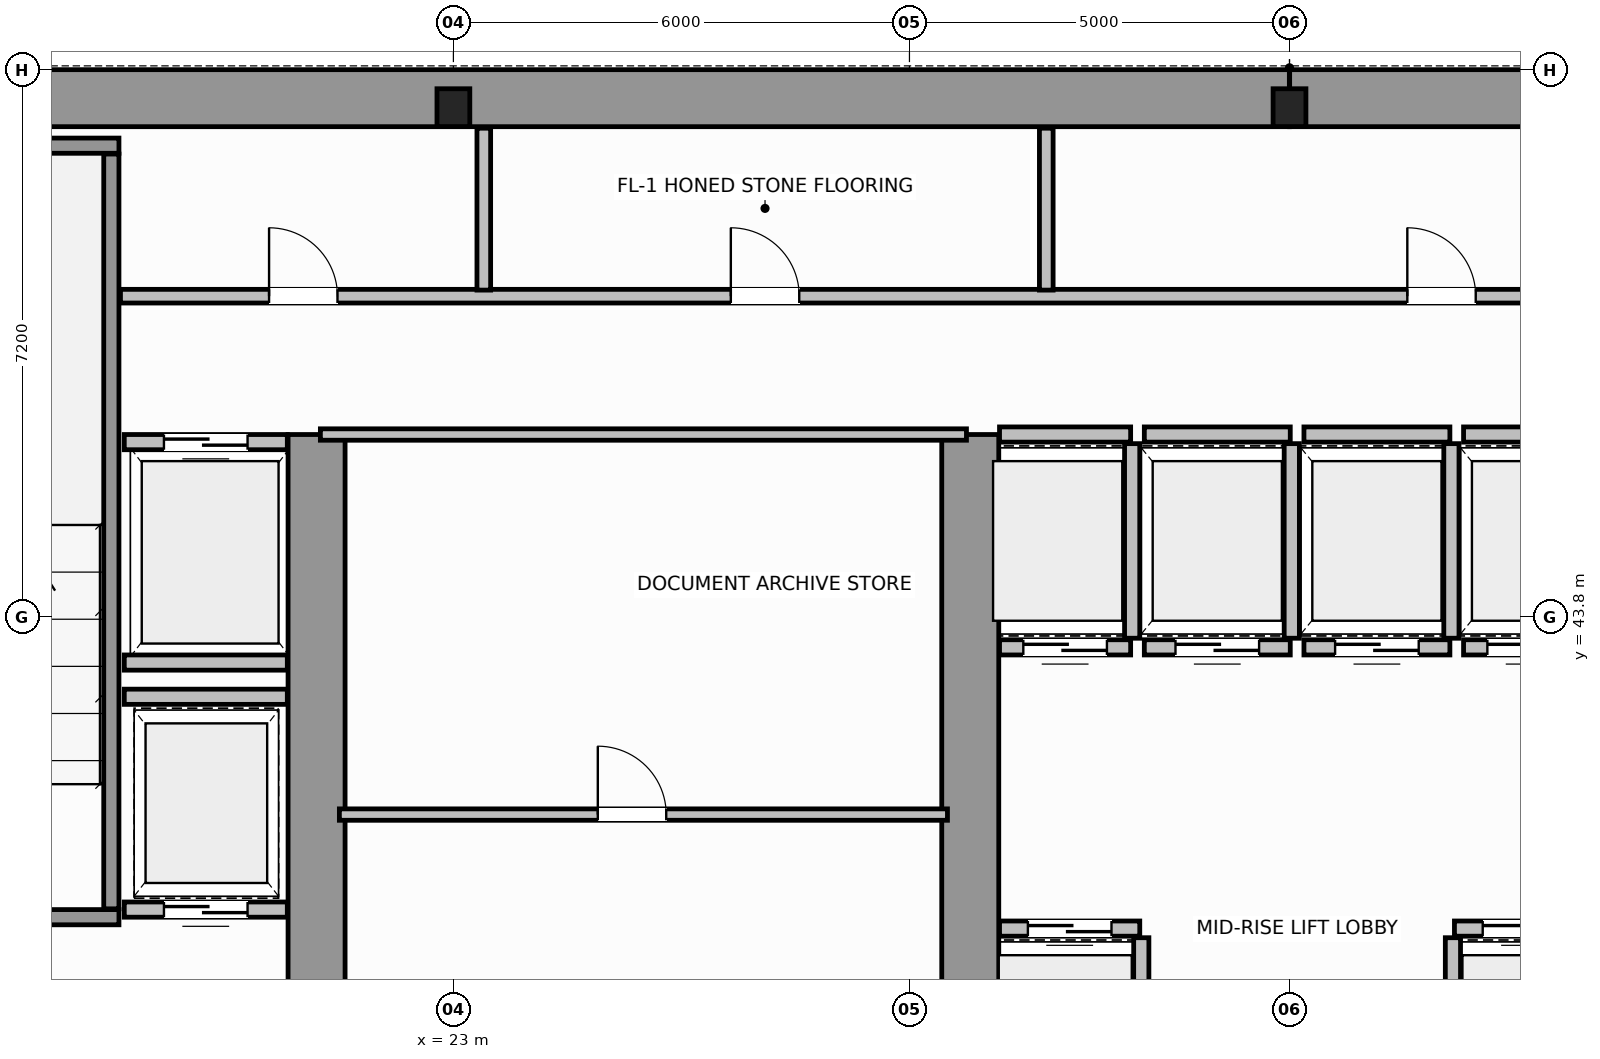
"""IFC4 building model, lengths in metres.
Left out: names, types, materials, properties, quantities, classifications, styles, units other than length and angle.
Written with IfcOpenShell. Run it as: python <this file> out.ifc"""

import sys

from ifc_helpers import new_model, si_unit, direction, frame, frame_2d, origin, origin_2d, place, context, subcontext, project, spatial, rectangle, i_section, extrude, source, transform, mapped, element, fill, save


model = new_model("IFC4")
c1 = context("Model", 3, precision=1e-05, world=origin(), true_north=direction((0.0, 1.0)))
c2 = subcontext(c1, "Body", "Model", "MODEL_VIEW")
j1 = project(units=[si_unit("LENGTHUNIT", "METRE"), si_unit("PLANEANGLEUNIT", "RADIAN")], contexts=[c1])
p1 = place(None, origin())
s1 = spatial("IfcSite", under=j1, at=p1, CompositionType="ELEMENT")
p2 = place(p1, origin())
s2 = spatial("IfcBuilding", under=s1, at=p2, CompositionType="ELEMENT")
p3 = place(p2, frame((0.0, 0.0, 145.2)))
s3 = spatial("IfcBuildingStorey", under=s2, at=p3, CompositionType="ELEMENT", Elevation=145.2)
m1 = source(origin(), c2, "Body", "SweptSolid", [
    extrude(i_section(OverallWidth=0.432, OverallDepth=0.498, WebThickness=0.055, FlangeThickness=0.068, FilletRadius=0.015, at=origin_2d()), origin(), (0.0, 0.0, 1.0), 3.8),
])
for number, where, z_axis, x_axis in (
    (1, (23.0, 50.5, 0.0), (0.0, 0.0, 1.0), (1.0, 0.0, 0.0)),
    (2, (34.0, 50.5, 0.0), (0.0, 0.0, 1.0), (1.0, 0.0, 0.0)),
):
    element("IfcColumn", number, at=place(p3, frame(where, z_axis=z_axis, x_axis=x_axis)), inside=s3, PredefinedType="COLUMN", context=c2, shape_type="MappedRepresentation", body=[
        mapped(m1, transform((0.0, 0.0, 0.0), scale=1.0)),
    ])
for number, where, z_axis, x_axis in (
    (3, (14.379, 50.625, 0.0), (0.0, 0.0, 1.0), (1.0, 0.0, 0.0)),
    (4, (34.002, 50.625, 0.0), (0.0, 0.0, 1.0), (1.0, 0.0, 0.0)),
):
    element("IfcWall", number, at=place(p3, frame(where, z_axis=z_axis, x_axis=x_axis)), inside=s3, PredefinedType="SHEAR", context=c2, shape_type="SweptSolid", body=[
        extrude(rectangle(XDim=19.619, YDim=0.75, at=frame_2d((9.81, 0.0))), origin(), (0.0, 0.0, 1.0), 3.8),
    ])
for number, where, z_axis, x_axis in (
    (5, (21.2, 36.895, 0.0), (0.0, 0.0, 1.0), (0.0, 1.0, 0.0)),
    (6, (29.8, 36.895, 0.0), (0.0, 0.0, 1.0), (0.0, 1.0, 0.0)),
):
    element("IfcWall", number, at=place(p3, frame(where, z_axis=z_axis, x_axis=x_axis)), inside=s3, PredefinedType="SHEAR", context=c2, shape_type="SweptSolid", body=[
        extrude(rectangle(XDim=9.305, YDim=0.75, at=frame_2d((4.652, 0.0))), origin(), (0.0, 0.0, 1.0), 3.8),
    ])
p4 = place(p3, frame((14.375, 39.85, 0.0), z_axis=(0.0, 0.0, 1.0), x_axis=(1.0, 0.0, 0.0)))
e7 = element("IfcWall", 7, at=p4, inside=s3, PredefinedType="SOLIDWALL", context=c2, shape_type="SweptSolid", body=[
    extrude(rectangle(XDim=4.225, YDim=0.2, at=frame_2d((2.113, 0.0))), origin(), (0.0, 0.0, 1.0), 3.8),
])
p5 = place(p4, frame((1.8, 0.0, 0.0)))
e8 = element("IfcOpeningElement", 8, at=p5, cuts=e7, PredefinedType="OPENING", context=c2, shape_type="SweptSolid", body=[
    extrude(rectangle(XDim=1.1, YDim=2.15, at=frame_2d((0.55, 1.075))), frame((0.0, 0.11, 0.0), z_axis=(0.0, -1.0, 0.0), x_axis=(1.0, 0.0, 0.0)), (0.0, 0.0, 1.0), 0.22),
])
p6 = place(p3, frame((14.375, 50.0, 0.0), z_axis=(0.0, 0.0, 1.0), x_axis=(1.0, 0.0, 0.0)))
e9 = element("IfcWall", 9, at=p6, inside=s3, PredefinedType="SOLIDWALL", context=c2, shape_type="SweptSolid", body=[
    extrude(rectangle(XDim=4.225, YDim=0.2, at=frame_2d((2.113, 0.0))), origin(), (0.0, 0.0, 1.0), 3.8),
])
p7 = place(p3, frame((18.5, 39.96, 0.0), z_axis=(0.0, 0.0, 1.0), x_axis=(0.0, 1.0, 0.0)))
e10 = element("IfcWall", 10, at=p7, inside=s3, PredefinedType="SOLIDWALL", context=c2, shape_type="SweptSolid", body=[
    extrude(rectangle(XDim=9.93, YDim=0.2, at=frame_2d((4.965, 0.0))), origin(), (0.0, 0.0, 1.0), 3.8),
])
p8 = place(p3, frame((30.185, 39.7, 0.0), z_axis=(0.0, 0.0, 1.0), x_axis=(1.0, 0.0, 0.0)))
e11 = element("IfcWall", 11, at=p8, inside=s3, PredefinedType="SOLIDWALL", context=c2, shape_type="SweptSolid", body=[
    extrude(rectangle(XDim=1.845, YDim=0.2, at=frame_2d((0.922, 0.0))), origin(), (0.0, 0.0, 1.0), 3.54),
])
p9 = place(p8, frame((0.373, 0.0, 0.0)))
e12 = element("IfcOpeningElement", 12, at=p9, cuts=e11, PredefinedType="OPENING", context=c2, shape_type="SweptSolid", body=[
    extrude(rectangle(XDim=1.1, YDim=2.15, at=frame_2d((0.55, 1.075))), frame((0.0, 0.11, 0.0), z_axis=(0.0, -1.0, 0.0), x_axis=(1.0, 0.0, 0.0)), (0.0, 0.0, 1.0), 0.22),
])
p10 = place(p3, frame((32.05, 37.02, 0.0), z_axis=(0.0, 0.0, 1.0), x_axis=(0.0, 1.0, 0.0)))
e13 = element("IfcWall", 13, at=p10, inside=s3, PredefinedType="SOLIDWALL", context=c2, shape_type="SweptSolid", body=[
    extrude(rectangle(XDim=2.56, YDim=0.2, at=frame_2d((1.28, 0.0))), origin(), (0.0, 0.0, 1.0), 3.54),
])
p11 = place(p3, frame((36.17, 39.7, 0.0), z_axis=(0.0, 0.0, 1.0), x_axis=(1.0, 0.0, 0.0)))
e14 = element("IfcWall", 14, at=p11, inside=s3, PredefinedType="SOLIDWALL", context=c2, shape_type="SweptSolid", body=[
    extrude(rectangle(XDim=1.845, YDim=0.2, at=frame_2d((0.922, 0.0))), origin(), (0.0, 0.0, 1.0), 3.54),
])
p12 = place(p11, frame((0.372, 0.0, 0.0)))
e15 = element("IfcOpeningElement", 15, at=p12, cuts=e14, PredefinedType="OPENING", context=c2, shape_type="SweptSolid", body=[
    extrude(rectangle(XDim=1.1, YDim=2.15, at=frame_2d((0.55, 1.075))), frame((0.0, 0.11, 0.0), z_axis=(0.0, -1.0, 0.0), x_axis=(1.0, 0.0, 0.0)), (0.0, 0.0, 1.0), 0.22),
])
p13 = place(p3, frame((36.15, 37.02, 0.0), z_axis=(0.0, 0.0, 1.0), x_axis=(0.0, 1.0, 0.0)))
e16 = element("IfcWall", 16, at=p13, inside=s3, PredefinedType="SOLIDWALL", context=c2, shape_type="SweptSolid", body=[
    extrude(rectangle(XDim=2.56, YDim=0.2, at=frame_2d((1.28, 0.0))), origin(), (0.0, 0.0, 1.0), 3.54),
])
p14 = place(p3, frame((30.185, 43.4, 0.0), z_axis=(0.0, 0.0, 1.0), x_axis=(1.0, 0.0, 0.0)))
e17 = element("IfcWall", 17, at=p14, inside=s3, PredefinedType="SOLIDWALL", context=c2, shape_type="SweptSolid", body=[
    extrude(rectangle(XDim=1.725, YDim=0.2, at=frame_2d((0.862, 0.0))), origin(), (0.0, 0.0, 1.0), 3.54),
])
p15 = place(p14, frame((0.313, 0.0, 0.0)))
e18 = element("IfcOpeningElement", 18, at=p15, cuts=e17, PredefinedType="OPENING", context=c2, shape_type="SweptSolid", body=[
    extrude(rectangle(XDim=1.1, YDim=2.15, at=frame_2d((0.55, 1.075))), frame((0.0, 0.11, 0.0), z_axis=(0.0, -1.0, 0.0), x_axis=(1.0, 0.0, 0.0)), (0.0, 0.0, 1.0), 0.22),
])
p16 = place(p3, frame((30.185, 46.2, 0.0), z_axis=(0.0, 0.0, 1.0), x_axis=(1.0, 0.0, 0.0)))
e19 = element("IfcWall", 19, at=p16, inside=s3, PredefinedType="SOLIDWALL", context=c2, shape_type="SweptSolid", body=[
    extrude(rectangle(XDim=1.725, YDim=0.2, at=frame_2d((0.862, 0.0))), origin(), (0.0, 0.0, 1.0), 3.54),
])
p17 = place(p3, frame((31.93, 43.52, 0.0), z_axis=(0.0, 0.0, 1.0), x_axis=(0.0, 1.0, 0.0)))
e20 = element("IfcWall", 20, at=p17, inside=s3, PredefinedType="SOLIDWALL", context=c2, shape_type="SweptSolid", body=[
    extrude(rectangle(XDim=2.56, YDim=0.2, at=frame_2d((1.28, 0.0))), origin(), (0.0, 0.0, 1.0), 3.54),
])
p18 = place(p3, frame((32.09, 43.4, 0.0), z_axis=(0.0, 0.0, 1.0), x_axis=(1.0, 0.0, 0.0)))
e21 = element("IfcWall", 21, at=p18, inside=s3, PredefinedType="SOLIDWALL", context=c2, shape_type="SweptSolid", body=[
    extrude(rectangle(XDim=1.92, YDim=0.2, at=frame_2d((0.96, 0.0))), origin(), (0.0, 0.0, 1.0), 3.54),
])
p19 = place(p18, frame((0.41, 0.0, 0.0)))
e22 = element("IfcOpeningElement", 22, at=p19, cuts=e21, PredefinedType="OPENING", context=c2, shape_type="SweptSolid", body=[
    extrude(rectangle(XDim=1.1, YDim=2.15, at=frame_2d((0.55, 1.075))), frame((0.0, 0.11, 0.0), z_axis=(0.0, -1.0, 0.0), x_axis=(1.0, 0.0, 0.0)), (0.0, 0.0, 1.0), 0.22),
])
p20 = place(p3, frame((32.09, 46.2, 0.0), z_axis=(0.0, 0.0, 1.0), x_axis=(1.0, 0.0, 0.0)))
e23 = element("IfcWall", 23, at=p20, inside=s3, PredefinedType="SOLIDWALL", context=c2, shape_type="SweptSolid", body=[
    extrude(rectangle(XDim=1.92, YDim=0.2, at=frame_2d((0.96, 0.0))), origin(), (0.0, 0.0, 1.0), 3.54),
])
p21 = place(p3, frame((34.03, 43.52, 0.0), z_axis=(0.0, 0.0, 1.0), x_axis=(0.0, 1.0, 0.0)))
e24 = element("IfcWall", 24, at=p21, inside=s3, PredefinedType="SOLIDWALL", context=c2, shape_type="SweptSolid", body=[
    extrude(rectangle(XDim=2.56, YDim=0.2, at=frame_2d((1.28, 0.0))), origin(), (0.0, 0.0, 1.0), 3.54),
])
p22 = place(p3, frame((34.19, 43.4, 0.0), z_axis=(0.0, 0.0, 1.0), x_axis=(1.0, 0.0, 0.0)))
e25 = element("IfcWall", 25, at=p22, inside=s3, PredefinedType="SOLIDWALL", context=c2, shape_type="SweptSolid", body=[
    extrude(rectangle(XDim=1.92, YDim=0.2, at=frame_2d((0.96, 0.0))), origin(), (0.0, 0.0, 1.0), 3.54),
])
p23 = place(p22, frame((0.41, 0.0, 0.0)))
e26 = element("IfcOpeningElement", 26, at=p23, cuts=e25, PredefinedType="OPENING", context=c2, shape_type="SweptSolid", body=[
    extrude(rectangle(XDim=1.1, YDim=2.15, at=frame_2d((0.55, 1.075))), frame((0.0, 0.11, 0.0), z_axis=(0.0, -1.0, 0.0), x_axis=(1.0, 0.0, 0.0)), (0.0, 0.0, 1.0), 0.22),
])
p24 = place(p3, frame((34.19, 46.2, 0.0), z_axis=(0.0, 0.0, 1.0), x_axis=(1.0, 0.0, 0.0)))
e27 = element("IfcWall", 27, at=p24, inside=s3, PredefinedType="SOLIDWALL", context=c2, shape_type="SweptSolid", body=[
    extrude(rectangle(XDim=1.92, YDim=0.2, at=frame_2d((0.96, 0.0))), origin(), (0.0, 0.0, 1.0), 3.54),
])
p25 = place(p3, frame((36.13, 43.52, 0.0), z_axis=(0.0, 0.0, 1.0), x_axis=(0.0, 1.0, 0.0)))
e28 = element("IfcWall", 28, at=p25, inside=s3, PredefinedType="SOLIDWALL", context=c2, shape_type="SweptSolid", body=[
    extrude(rectangle(XDim=2.56, YDim=0.2, at=frame_2d((1.28, 0.0))), origin(), (0.0, 0.0, 1.0), 3.54),
])
p26 = place(p3, frame((36.29, 43.4, 0.0), z_axis=(0.0, 0.0, 1.0), x_axis=(1.0, 0.0, 0.0)))
e29 = element("IfcWall", 29, at=p26, inside=s3, PredefinedType="SOLIDWALL", context=c2, shape_type="SweptSolid", body=[
    extrude(rectangle(XDim=1.725, YDim=0.2, at=frame_2d((0.862, 0.0))), origin(), (0.0, 0.0, 1.0), 3.54),
])
p27 = place(p26, frame((0.313, 0.0, 0.0)))
e30 = element("IfcOpeningElement", 30, at=p27, cuts=e29, PredefinedType="OPENING", context=c2, shape_type="SweptSolid", body=[
    extrude(rectangle(XDim=1.1, YDim=2.15, at=frame_2d((0.55, 1.075))), frame((0.0, 0.11, 0.0), z_axis=(0.0, -1.0, 0.0), x_axis=(1.0, 0.0, 0.0)), (0.0, 0.0, 1.0), 0.22),
])
p28 = place(p3, frame((36.29, 46.2, 0.0), z_axis=(0.0, 0.0, 1.0), x_axis=(1.0, 0.0, 0.0)))
e31 = element("IfcWall", 31, at=p28, inside=s3, PredefinedType="SOLIDWALL", context=c2, shape_type="SweptSolid", body=[
    extrude(rectangle(XDim=1.725, YDim=0.2, at=frame_2d((0.862, 0.0))), origin(), (0.0, 0.0, 1.0), 3.54),
])
p29 = place(p3, frame((18.67, 46.1, 0.0), z_axis=(0.0, 0.0, 1.0), x_axis=(1.0, 0.0, 0.0)))
e32 = element("IfcWall", 32, at=p29, inside=s3, PredefinedType="SOLIDWALL", context=c2, shape_type="SweptSolid", body=[
    extrude(rectangle(XDim=2.145, YDim=0.2, at=frame_2d((1.073, 0.0))), origin(), (0.0, 0.0, 1.0), 3.54),
])
p30 = place(p29, frame((0.522, 0.0, 0.0)))
e33 = element("IfcOpeningElement", 33, at=p30, cuts=e32, PredefinedType="OPENING", context=c2, shape_type="SweptSolid", body=[
    extrude(rectangle(XDim=1.1, YDim=2.15, at=frame_2d((0.55, 1.075))), frame((0.0, 0.11, 0.0), z_axis=(0.0, -1.0, 0.0), x_axis=(1.0, 0.0, 0.0)), (0.0, 0.0, 1.0), 0.22),
])
p31 = place(p3, frame((18.67, 43.2, 0.0), z_axis=(0.0, 0.0, 1.0), x_axis=(1.0, 0.0, 0.0)))
e34 = element("IfcWall", 34, at=p31, inside=s3, PredefinedType="SOLIDWALL", context=c2, shape_type="SweptSolid", body=[
    extrude(rectangle(XDim=2.145, YDim=0.2, at=frame_2d((1.073, 0.0))), origin(), (0.0, 0.0, 1.0), 3.54),
])
p32 = place(p3, frame((18.67, 39.95, 0.0), z_axis=(0.0, 0.0, 1.0), x_axis=(1.0, 0.0, 0.0)))
e35 = element("IfcWall", 35, at=p32, inside=s3, PredefinedType="SOLIDWALL", context=c2, shape_type="SweptSolid", body=[
    extrude(rectangle(XDim=2.145, YDim=0.2, at=frame_2d((1.073, 0.0))), origin(), (0.0, 0.0, 1.0), 3.54),
])
p33 = place(p32, frame((0.522, 0.0, 0.0)))
e36 = element("IfcOpeningElement", 36, at=p33, cuts=e35, PredefinedType="OPENING", context=c2, shape_type="SweptSolid", body=[
    extrude(rectangle(XDim=1.1, YDim=2.15, at=frame_2d((0.55, 1.075))), frame((0.0, 0.11, 0.0), z_axis=(0.0, -1.0, 0.0), x_axis=(1.0, 0.0, 0.0)), (0.0, 0.0, 1.0), 0.22),
])
p34 = place(p3, frame((18.67, 42.75, 0.0), z_axis=(0.0, 0.0, 1.0), x_axis=(1.0, 0.0, 0.0)))
e37 = element("IfcWall", 37, at=p34, inside=s3, PredefinedType="SOLIDWALL", context=c2, shape_type="SweptSolid", body=[
    extrude(rectangle(XDim=2.145, YDim=0.2, at=frame_2d((1.073, 0.0))), origin(), (0.0, 0.0, 1.0), 3.54),
])
p35 = place(p3, frame((21.25, 46.2, 0.0), z_axis=(0.0, 0.0, 1.0), x_axis=(1.0, 0.0, 0.0)))
e38 = element("IfcWall", 38, at=p35, inside=s3, PredefinedType="PARTITIONING", context=c2, shape_type="SweptSolid", body=[
    extrude(rectangle(XDim=8.5, YDim=0.15, at=frame_2d((4.25, 0.0))), origin(), (0.0, 0.0, 1.0), 3.54),
])
p36 = place(p3, frame((21.5, 41.2, 0.0), z_axis=(0.0, 0.0, 1.0), x_axis=(1.0, 0.0, 0.0)))
e39 = element("IfcWall", 39, at=p36, inside=s3, PredefinedType="PARTITIONING", context=c2, shape_type="SweptSolid", body=[
    extrude(rectangle(XDim=8.0, YDim=0.15, at=frame_2d((4.0, 0.0))), origin(), (0.0, 0.0, 1.0), 3.54),
])
p37 = place(p36, frame((3.4, 0.0, 0.0)))
e40 = element("IfcOpeningElement", 40, at=p37, cuts=e39, PredefinedType="OPENING", context=c2, shape_type="SweptSolid", body=[
    extrude(rectangle(XDim=0.9, YDim=2.1, at=frame_2d((0.45, 1.05))), frame((0.0, 0.085, 0.0), z_axis=(0.0, -1.0, 0.0), x_axis=(1.0, 0.0, 0.0)), (0.0, 0.0, 1.0), 0.17),
])
p38 = place(p3, frame((18.62, 48.02, 0.0), z_axis=(0.0, 0.0, 1.0), x_axis=(1.0, 0.0, 0.0)))
e41 = element("IfcWall", 41, at=p38, inside=s3, PredefinedType="PLUMBINGWALL", context=c2, shape_type="SweptSolid", body=[
    extrude(rectangle(XDim=30.76, YDim=0.18, at=frame_2d((15.38, 0.0))), origin(), (0.0, 0.0, 1.0), 3.54),
])
p39 = place(p38, frame((1.955, 0.0, 0.0)))
e42 = element("IfcOpeningElement", 42, at=p39, cuts=e41, PredefinedType="OPENING", context=c2, shape_type="SweptSolid", body=[
    extrude(rectangle(XDim=0.9, YDim=2.15, at=frame_2d((0.45, 1.075))), frame((0.0, 0.1, 0.0), z_axis=(0.0, -1.0, 0.0), x_axis=(1.0, 0.0, 0.0)), (0.0, 0.0, 1.0), 0.2),
])
p40 = place(p38, frame((8.03, 0.0, 0.0)))
e43 = element("IfcOpeningElement", 43, at=p40, cuts=e41, PredefinedType="OPENING", context=c2, shape_type="SweptSolid", body=[
    extrude(rectangle(XDim=0.9, YDim=2.15, at=frame_2d((0.45, 1.075))), frame((0.0, 0.1, 0.0), z_axis=(0.0, -1.0, 0.0), x_axis=(1.0, 0.0, 0.0)), (0.0, 0.0, 1.0), 0.2),
])
p41 = place(p38, frame((16.93, 0.0, 0.0)))
e44 = element("IfcOpeningElement", 44, at=p41, cuts=e41, PredefinedType="OPENING", context=c2, shape_type="SweptSolid", body=[
    extrude(rectangle(XDim=0.9, YDim=2.15, at=frame_2d((0.45, 1.075))), frame((0.0, 0.1, 0.0), z_axis=(0.0, -1.0, 0.0), x_axis=(1.0, 0.0, 0.0)), (0.0, 0.0, 1.0), 0.2),
])
p42 = place(p38, frame((26.205, 0.0, 0.0)))
e45 = element("IfcOpeningElement", 45, at=p42, cuts=e41, PredefinedType="OPENING", context=c2, shape_type="SweptSolid", body=[
    extrude(rectangle(XDim=0.9, YDim=2.15, at=frame_2d((0.45, 1.075))), frame((0.0, 0.1, 0.0), z_axis=(0.0, -1.0, 0.0), x_axis=(1.0, 0.0, 0.0)), (0.0, 0.0, 1.0), 0.2),
])
for number, where, z_axis, x_axis in (
    (46, (23.4, 48.1, 0.0), (0.0, 0.0, 1.0), (0.0, 1.0, 0.0)),
    (47, (30.8, 48.1, 0.0), (0.0, 0.0, 1.0), (0.0, 1.0, 0.0)),
):
    element("IfcWall", number, at=place(p3, frame(where, z_axis=z_axis, x_axis=x_axis)), inside=s3, PredefinedType="PLUMBINGWALL", context=c2, shape_type="SweptSolid", body=[
        extrude(rectangle(XDim=2.13, YDim=0.18, at=frame_2d((1.065, 0.0))), origin(), (0.0, 0.0, 1.0), 3.54),
    ])
m2 = source(origin(), c2, "Body", "SweptSolid", [
    extrude(rectangle(XDim=1.1, YDim=2.15, at=frame_2d((0.55, 1.075))), frame((0.0, 0.025, 0.0), z_axis=(0.0, -1.0, 0.0), x_axis=(1.0, 0.0, 0.0)), (0.0, 0.0, 1.0), 0.05),
])
p43 = place(p9, origin())
e48 = element("IfcDoor", 48, at=p43, inside=s3, OperationType="DOUBLE_DOOR_SLIDING", PredefinedType="DOOR", context=c2, shape_type="MappedRepresentation", body=[
    mapped(m2, transform((0.0, 0.0, 0.0), scale=1.0)),
])
fill(e12, e48)
p44 = place(p12, origin())
e49 = element("IfcDoor", 49, at=p44, inside=s3, OperationType="DOUBLE_DOOR_SLIDING", PredefinedType="DOOR", context=c2, shape_type="MappedRepresentation", body=[
    mapped(m2, transform((0.0, 0.0, 0.0), scale=1.0)),
])
fill(e15, e49)
p45 = place(p15, origin())
e50 = element("IfcDoor", 50, at=p45, inside=s3, OperationType="DOUBLE_DOOR_SLIDING", PredefinedType="DOOR", context=c2, shape_type="MappedRepresentation", body=[
    mapped(m2, transform((0.0, 0.0, 0.0), scale=1.0)),
])
fill(e18, e50)
p46 = place(p19, origin())
e51 = element("IfcDoor", 51, at=p46, inside=s3, OperationType="DOUBLE_DOOR_SLIDING", PredefinedType="DOOR", context=c2, shape_type="MappedRepresentation", body=[
    mapped(m2, transform((0.0, 0.0, 0.0), scale=1.0)),
])
fill(e22, e51)
p47 = place(p23, origin())
e52 = element("IfcDoor", 52, at=p47, inside=s3, OperationType="DOUBLE_DOOR_SLIDING", PredefinedType="DOOR", context=c2, shape_type="MappedRepresentation", body=[
    mapped(m2, transform((0.0, 0.0, 0.0), scale=1.0)),
])
fill(e26, e52)
p48 = place(p27, origin())
e53 = element("IfcDoor", 53, at=p48, inside=s3, OperationType="DOUBLE_DOOR_SLIDING", PredefinedType="DOOR", context=c2, shape_type="MappedRepresentation", body=[
    mapped(m2, transform((0.0, 0.0, 0.0), scale=1.0)),
])
fill(e30, e53)
p49 = place(p30, origin())
e54 = element("IfcDoor", 54, at=p49, inside=s3, OperationType="DOUBLE_DOOR_SLIDING", PredefinedType="DOOR", context=c2, shape_type="MappedRepresentation", body=[
    mapped(m2, transform((0.0, 0.0, 0.0), scale=1.0)),
])
fill(e33, e54)
p50 = place(p33, origin())
e55 = element("IfcDoor", 55, at=p50, inside=s3, OperationType="DOUBLE_DOOR_SLIDING", PredefinedType="DOOR", context=c2, shape_type="MappedRepresentation", body=[
    mapped(m2, transform((0.0, 0.0, 0.0), scale=1.0)),
])
fill(e36, e55)
m3 = source(origin(), c2, "Body", "SweptSolid", [
    extrude(rectangle(XDim=0.9, YDim=2.1, at=frame_2d((0.45, 1.05))), frame((0.0, 0.025, 0.0), z_axis=(0.0, -1.0, 0.0), x_axis=(1.0, 0.0, 0.0)), (0.0, 0.0, 1.0), 0.05),
])
p51 = place(p37, origin())
e56 = element("IfcDoor", 56, at=p51, inside=s3, OperationType="SINGLE_SWING_RIGHT", PredefinedType="DOOR", context=c2, shape_type="MappedRepresentation", body=[
    mapped(m3, transform((0.0, 0.0, 0.0), scale=1.0)),
])
fill(e40, e56)
m4 = source(origin(), c2, "Body", "SweptSolid", [
    extrude(rectangle(XDim=0.9, YDim=2.15, at=frame_2d((0.45, 1.075))), frame((0.0, 0.025, 0.0), z_axis=(0.0, -1.0, 0.0), x_axis=(1.0, 0.0, 0.0)), (0.0, 0.0, 1.0), 0.05),
])
p52 = place(p39, origin())
e57 = element("IfcDoor", 57, at=p52, inside=s3, OperationType="SINGLE_SWING_LEFT", PredefinedType="DOOR", context=c2, shape_type="MappedRepresentation", body=[
    mapped(m4, transform((0.0, 0.0, 0.0), scale=1.0)),
])
fill(e42, e57)
p53 = place(p40, origin())
e58 = element("IfcDoor", 58, at=p53, inside=s3, OperationType="SINGLE_SWING_RIGHT", PredefinedType="DOOR", context=c2, shape_type="MappedRepresentation", body=[
    mapped(m4, transform((0.0, 0.0, 0.0), scale=1.0)),
])
fill(e43, e58)
p54 = place(p41, origin())
e59 = element("IfcDoor", 59, at=p54, inside=s3, OperationType="SINGLE_SWING_LEFT", PredefinedType="DOOR", context=c2, shape_type="MappedRepresentation", body=[
    mapped(m4, transform((0.0, 0.0, 0.0), scale=1.0)),
])
fill(e44, e59)
save(model, sys.argv[1])
